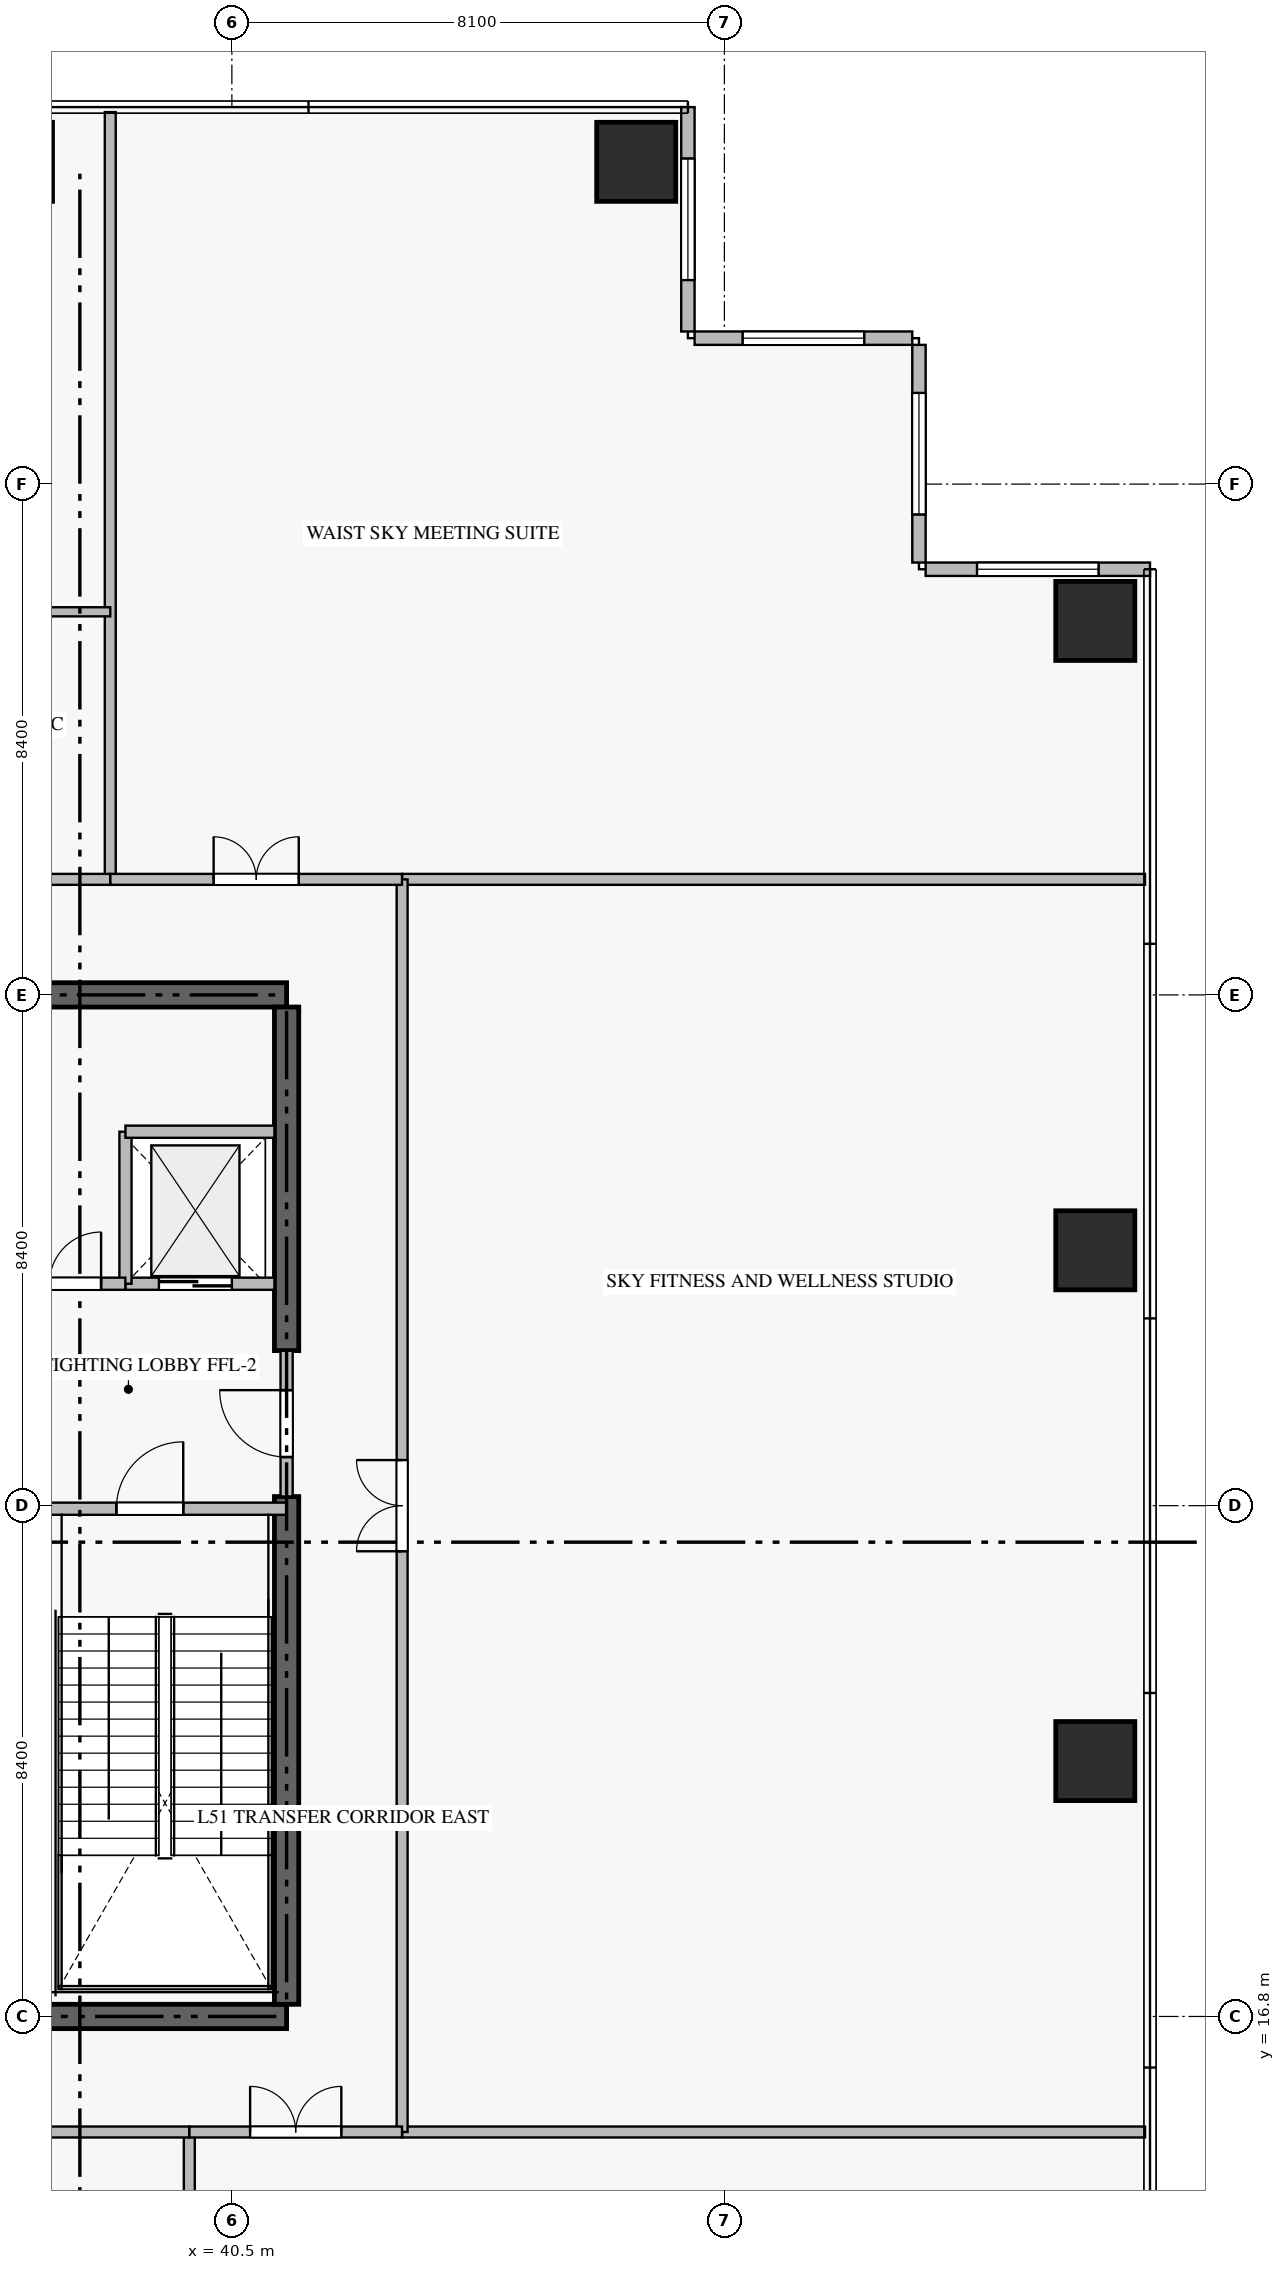
"""IFC4 building model, lengths in metres.
Left out: names, types, materials, properties, quantities, classifications, styles, units other than length and angle.
Written with IfcOpenShell. Run it as: python <this file> out.ifc"""

import sys

from ifc_helpers import new_model, si_unit, direction, frame, frame_2d, origin, origin_2d, place, context, subcontext, project, spatial, rectangle, extrude, source, transform, mapped, element, fill, save


model = new_model("IFC4")
c1 = context("Model", 3, precision=1e-05, world=origin(), true_north=direction((0.0, 1.0)))
c2 = subcontext(c1, "Body", "Model", "MODEL_VIEW")
j1 = project(units=[si_unit("LENGTHUNIT", "METRE"), si_unit("PLANEANGLEUNIT", "RADIAN")], contexts=[c1])
p1 = place(None, origin())
s1 = spatial("IfcSite", under=j1, at=p1, CompositionType="ELEMENT")
p2 = place(p1, origin())
s2 = spatial("IfcBuilding", under=s1, at=p2, CompositionType="ELEMENT")
p3 = place(p2, frame((0.0, 0.0, 204.9)))
s3 = spatial("IfcBuildingStorey", under=s2, at=p3, CompositionType="ELEMENT", Elevation=204.9)
for number, where, z_axis, x_axis in (
    (1, (23.4, 16.8, -0.36), (0.0, 0.0, 1.0), (1.0, 0.0, 0.0)),
    (2, (41.4, 33.6, -0.36), (0.0, 0.0, 1.0), (-1.0, 0.0, 0.0)),
):
    element("IfcWall", number, at=place(p3, frame(where, z_axis=z_axis, x_axis=x_axis)), inside=s3, PredefinedType="SHEAR", context=c2, shape_type="SweptSolid", body=[
        extrude(rectangle(XDim=18.0, YDim=0.4, at=frame_2d((9.0, 0.0))), origin(), (0.0, 0.0, 1.0), 5.468),
    ])
p4 = place(p3, frame((41.4, 17.0, -0.36), z_axis=(0.0, 0.0, 1.0), x_axis=(0.0, 1.0, 0.0)))
e3 = element("IfcWall", 3, at=p4, inside=s3, PredefinedType="SHEAR", context=c2, shape_type="SweptSolid", body=[
    extrude(rectangle(XDim=8.35, YDim=0.4, at=frame_2d((4.175, 0.0))), origin(), (0.0, 0.0, 1.0), 5.468),
])
p5 = place(p3, frame((41.4, 27.75, -0.36), z_axis=(0.0, 0.0, 1.0), x_axis=(0.0, 1.0, 0.0)))
e4 = element("IfcWall", 4, at=p5, inside=s3, PredefinedType="SHEAR", context=c2, shape_type="SweptSolid", body=[
    extrude(rectangle(XDim=5.65, YDim=0.4, at=frame_2d((2.825, 0.0))), origin(), (0.0, 0.0, 1.0), 5.468),
])
m1 = source(origin(), c2, "Body", "SweptSolid", [
    extrude(rectangle(XDim=1.3, YDim=1.3, at=origin_2d()), origin(), (0.0, 0.0, 1.0), 5.47),
])
for number, where, z_axis, x_axis in (
    (5, (47.15, 47.3, -0.36), (0.0, 0.0, 1.0), (1.0, 0.0, 0.0)),
    (6, (54.7, 21.0, -0.36), (0.0, 0.0, 1.0), (1.0, 0.0, 0.0)),
    (7, (54.7, 29.4, -0.36), (0.0, 0.0, 1.0), (1.0, 0.0, 0.0)),
    (8, (54.7, 39.75, -0.36), (0.0, 0.0, 1.0), (1.0, 0.0, 0.0)),
):
    element("IfcColumn", number, at=place(p3, frame(where, z_axis=z_axis, x_axis=x_axis)), inside=s3, PredefinedType="COLUMN", context=c2, shape_type="MappedRepresentation", body=[
        mapped(m1, transform((0.0, 0.0, 0.0), scale=1.0)),
    ])
p6 = place(p3, frame((55.6, 40.6, 0.0), z_axis=(0.0, 0.0, 1.0), x_axis=(-1.0, 0.0, 0.0)))
e9 = element("IfcWall", 9, at=p6, inside=s3, PredefinedType="ELEMENTEDWALL", context=c2, shape_type="SweptSolid", body=[
    extrude(rectangle(XDim=3.69, YDim=0.22, at=frame_2d((1.845, 0.0))), origin(), (0.0, 0.0, 1.0), 3.945),
])
p7 = place(p6, frame((0.845, 0.0, 0.65)))
e10 = element("IfcOpeningElement", 10, at=p7, cuts=e9, PredefinedType="OPENING", context=c2, shape_type="SweptSolid", body=[
    extrude(rectangle(XDim=2.0, YDim=2.2, at=frame_2d((1.0, 1.1))), frame((0.0, 0.12, 0.0), z_axis=(0.0, -1.0, 0.0), x_axis=(1.0, 0.0, 0.0)), (0.0, 0.0, 1.0), 0.24),
])
p8 = place(p3, frame((51.8, 40.71, 0.0), z_axis=(0.0, 0.0, 1.0), x_axis=(0.0, 1.0, 0.0)))
e11 = element("IfcWall", 11, at=p8, inside=s3, PredefinedType="ELEMENTEDWALL", context=c2, shape_type="SweptSolid", body=[
    extrude(rectangle(XDim=3.58, YDim=0.22, at=frame_2d((1.79, 0.0))), origin(), (0.0, 0.0, 1.0), 5.095),
])
p9 = place(p8, frame((0.79, 0.0, 0.65)))
e12 = element("IfcOpeningElement", 12, at=p9, cuts=e11, PredefinedType="OPENING", context=c2, shape_type="SweptSolid", body=[
    extrude(rectangle(XDim=2.0, YDim=2.2, at=frame_2d((1.0, 1.1))), frame((0.0, 0.12, 0.0), z_axis=(0.0, -1.0, 0.0), x_axis=(1.0, 0.0, 0.0)), (0.0, 0.0, 1.0), 0.24),
])
p10 = place(p3, frame((51.69, 44.4, 0.0), z_axis=(0.0, 0.0, 1.0), x_axis=(-1.0, 0.0, 0.0)))
e13 = element("IfcWall", 13, at=p10, inside=s3, PredefinedType="ELEMENTEDWALL", context=c2, shape_type="SweptSolid", body=[
    extrude(rectangle(XDim=3.58, YDim=0.22, at=frame_2d((1.79, 0.0))), origin(), (0.0, 0.0, 1.0), 5.095),
])
p11 = place(p10, frame((0.79, 0.0, 0.65)))
e14 = element("IfcOpeningElement", 14, at=p11, cuts=e13, PredefinedType="OPENING", context=c2, shape_type="SweptSolid", body=[
    extrude(rectangle(XDim=2.0, YDim=2.2, at=frame_2d((1.0, 1.1))), frame((0.0, 0.12, 0.0), z_axis=(0.0, -1.0, 0.0), x_axis=(1.0, 0.0, 0.0)), (0.0, 0.0, 1.0), 0.24),
])
p12 = place(p3, frame((48.0, 44.51, 0.0), z_axis=(0.0, 0.0, 1.0), x_axis=(0.0, 1.0, 0.0)))
e15 = element("IfcWall", 15, at=p12, inside=s3, PredefinedType="ELEMENTEDWALL", context=c2, shape_type="SweptSolid", body=[
    extrude(rectangle(XDim=3.69, YDim=0.22, at=frame_2d((1.845, 0.0))), origin(), (0.0, 0.0, 1.0), 3.945),
])
p13 = place(p12, frame((0.845, 0.0, 0.65)))
e16 = element("IfcOpeningElement", 16, at=p13, cuts=e15, PredefinedType="OPENING", context=c2, shape_type="SweptSolid", body=[
    extrude(rectangle(XDim=2.0, YDim=2.2, at=frame_2d((1.0, 1.1))), frame((0.0, 0.12, 0.0), z_axis=(0.0, -1.0, 0.0), x_axis=(1.0, 0.0, 0.0)), (0.0, 0.0, 1.0), 0.24),
])
p14 = place(p3, frame((36.95, 25.15, 0.0), z_axis=(0.0, 0.0, 1.0), x_axis=(1.0, 0.0, 0.0)))
e17 = element("IfcWall", 17, at=p14, inside=s3, PredefinedType="STANDARD", context=c2, shape_type="SweptSolid", body=[
    extrude(rectangle(XDim=4.45, YDim=0.2, at=frame_2d((2.225, 0.0))), origin(), (0.0, 0.0, 1.0), 5.11),
])
p15 = place(p14, frame((1.65, 0.0, 0.0)))
e18 = element("IfcOpeningElement", 18, at=p15, cuts=e17, PredefinedType="OPENING", context=c2, shape_type="SweptSolid", body=[
    extrude(rectangle(XDim=1.1, YDim=2.15, at=frame_2d((0.55, 1.075))), frame((0.0, 0.11, 0.0), z_axis=(0.0, -1.0, 0.0), x_axis=(1.0, 0.0, 0.0)), (0.0, 0.0, 1.0), 0.22),
])
p16 = place(p3, frame((38.75, 28.85, 0.0), z_axis=(0.0, 0.0, 1.0), x_axis=(1.0, 0.0, 0.0)))
e19 = element("IfcWall", 19, at=p16, inside=s3, PredefinedType="STANDARD", context=c2, shape_type="SweptSolid", body=[
    extrude(rectangle(XDim=2.45, YDim=0.2, at=frame_2d((1.225, 0.0))), origin(), (0.0, 0.0, 1.0), 5.11),
])
p17 = place(p16, frame((0.55, 0.0, 0.0)))
e20 = element("IfcOpeningElement", 20, at=p17, cuts=e19, PredefinedType="OPENING", context=c2, shape_type="SweptSolid", body=[
    extrude(rectangle(XDim=1.2, YDim=2.2, at=frame_2d((0.6, 1.1))), frame((0.0, 0.11, 0.0), z_axis=(0.0, -1.0, 0.0), x_axis=(1.0, 0.0, 0.0)), (0.0, 0.0, 1.0), 0.22),
])
p18 = place(p3, frame((38.75, 28.85, 0.0), z_axis=(0.0, 0.0, 1.0), x_axis=(0.0, 1.0, 0.0)))
e21 = element("IfcWall", 21, at=p18, inside=s3, PredefinedType="STANDARD", context=c2, shape_type="SweptSolid", body=[
    extrude(rectangle(XDim=2.5, YDim=0.2, at=frame_2d((1.25, 0.0))), origin(), (0.0, 0.0, 1.0), 5.11),
])
p19 = place(p3, frame((38.75, 31.35, 0.0), z_axis=(0.0, 0.0, 1.0), x_axis=(1.0, 0.0, 0.0)))
e22 = element("IfcWall", 22, at=p19, inside=s3, PredefinedType="STANDARD", context=c2, shape_type="SweptSolid", body=[
    extrude(rectangle(XDim=2.45, YDim=0.2, at=frame_2d((1.225, 0.0))), origin(), (0.0, 0.0, 1.0), 5.11),
])
p20 = place(p3, frame((37.1, 28.85, 0.0), z_axis=(0.0, 0.0, 1.0), x_axis=(1.0, 0.0, 0.0)))
e23 = element("IfcWall", 23, at=p20, inside=s3, PredefinedType="STANDARD", context=c2, shape_type="SweptSolid", body=[
    extrude(rectangle(XDim=1.648, YDim=0.2, at=frame_2d((0.824, 0.0))), origin(), (0.0, 0.0, 1.0), 5.11),
])
p21 = place(p20, frame((0.399, 0.0, 0.0)))
e24 = element("IfcOpeningElement", 24, at=p21, cuts=e23, PredefinedType="OPENING", context=c2, shape_type="SweptSolid", body=[
    extrude(rectangle(XDim=0.85, YDim=2.1, at=frame_2d((0.425, 1.05))), frame((0.0, 0.11, 0.0), z_axis=(0.0, -1.0, 0.0), x_axis=(1.0, 0.0, 0.0)), (0.0, 0.0, 1.0), 0.22),
])
p22 = place(p3, frame((41.4, 25.352, 0.0), z_axis=(0.0, 0.0, 1.0), x_axis=(0.0, 1.0, 0.0)))
e25 = element("IfcWall", 25, at=p22, inside=s3, PredefinedType="STANDARD", context=c2, shape_type="SweptSolid", body=[
    extrude(rectangle(XDim=2.396, YDim=0.2, at=frame_2d((1.198, 0.0))), origin(), (0.0, 0.0, 1.0), 5.11),
])
p23 = place(p22, frame((0.648, 0.0, 0.0)))
e26 = element("IfcOpeningElement", 26, at=p23, cuts=e25, PredefinedType="OPENING", context=c2, shape_type="SweptSolid", body=[
    extrude(rectangle(XDim=1.1, YDim=2.15, at=frame_2d((0.55, 1.075))), frame((0.0, 0.11, 0.0), z_axis=(0.0, -1.0, 0.0), x_axis=(1.0, 0.0, 0.0)), (0.0, 0.0, 1.0), 0.22),
])
for number, where, z_axis, x_axis in (
    (27, (43.3, 14.9, 0.0), (0.0, 0.0, 1.0), (1.0, 0.0, 0.0)),
    (28, (43.3, 35.5, 0.0), (0.0, 0.0, 1.0), (1.0, 0.0, 0.0)),
):
    element("IfcWall", number, at=place(p3, frame(where, z_axis=z_axis, x_axis=x_axis)), inside=s3, PredefinedType="PARTITIONING", context=c2, shape_type="SweptSolid", body=[
        extrude(rectangle(XDim=12.218, YDim=0.18, at=frame_2d((6.109, 0.0))), origin(), (0.0, 0.0, 1.0), 5.11),
    ])
p24 = place(p3, frame((43.3, 14.9, 0.0), z_axis=(0.0, 0.0, 1.0), x_axis=(0.0, 1.0, 0.0)))
e29 = element("IfcWall", 29, at=p24, inside=s3, PredefinedType="PARTITIONING", context=c2, shape_type="SweptSolid", body=[
    extrude(rectangle(XDim=20.6, YDim=0.18, at=frame_2d((10.3, 0.0))), origin(), (0.0, 0.0, 1.0), 5.11),
])
p25 = place(p24, frame((9.55, 0.0, 0.0)))
e30 = element("IfcOpeningElement", 30, at=p25, cuts=e29, PredefinedType="OPENING", context=c2, shape_type="SweptSolid", body=[
    extrude(rectangle(XDim=1.5, YDim=2.25, at=frame_2d((0.75, 1.125))), frame((0.0, 0.1, 0.0), z_axis=(0.0, -1.0, 0.0), x_axis=(1.0, 0.0, 0.0)), (0.0, 0.0, 1.0), 0.2),
])
for number, where, z_axis, x_axis in (
    (31, (39.8, 2.282, 0.0), (0.0, 0.0, 1.0), (0.0, 1.0, 0.0)),
    (32, (38.5, 35.5, 0.0), (0.0, 0.0, 1.0), (0.0, 1.0, 0.0)),
):
    element("IfcWall", number, at=place(p3, frame(where, z_axis=z_axis, x_axis=x_axis)), inside=s3, PredefinedType="PARTITIONING", context=c2, shape_type="SweptSolid", body=[
        extrude(rectangle(XDim=12.618, YDim=0.18, at=frame_2d((6.309, 0.0))), origin(), (0.0, 0.0, 1.0), 5.11),
    ])
p26 = place(p3, frame((29.502, 14.9, 0.0), z_axis=(0.0, 0.0, 1.0), x_axis=(1.0, 0.0, 0.0)))
e33 = element("IfcWall", 33, at=p26, inside=s3, PredefinedType="PARTITIONING", context=c2, shape_type="SweptSolid", body=[
    extrude(rectangle(XDim=10.298, YDim=0.18, at=frame_2d((5.149, 0.0))), origin(), (0.0, 0.0, 1.0), 5.11),
])
p27 = place(p26, frame((4.349, 0.0, 0.0)))
e34 = element("IfcOpeningElement", 34, at=p27, cuts=e33, PredefinedType="OPENING", context=c2, shape_type="SweptSolid", body=[
    extrude(rectangle(XDim=1.6, YDim=2.3, at=frame_2d((0.8, 1.15))), frame((0.0, 0.1, 0.0), z_axis=(0.0, -1.0, 0.0), x_axis=(1.0, 0.0, 0.0)), (0.0, 0.0, 1.0), 0.2),
])
p28 = place(p3, frame((39.802, 14.9, 0.0), z_axis=(0.0, 0.0, 1.0), x_axis=(1.0, 0.0, 0.0)))
e35 = element("IfcWall", 35, at=p28, inside=s3, PredefinedType="PARTITIONING", context=c2, shape_type="SweptSolid", body=[
    extrude(rectangle(XDim=3.496, YDim=0.18, at=frame_2d((1.748, 0.0))), origin(), (0.0, 0.0, 1.0), 5.11),
])
p29 = place(p28, frame((0.998, 0.0, 0.0)))
e36 = element("IfcOpeningElement", 36, at=p29, cuts=e35, PredefinedType="OPENING", context=c2, shape_type="SweptSolid", body=[
    extrude(rectangle(XDim=1.5, YDim=2.25, at=frame_2d((0.75, 1.125))), frame((0.0, 0.1, 0.0), z_axis=(0.0, -1.0, 0.0), x_axis=(1.0, 0.0, 0.0)), (0.0, 0.0, 1.0), 0.2),
])
p30 = place(p3, frame((33.302, 35.5, 0.0), z_axis=(0.0, 0.0, 1.0), x_axis=(1.0, 0.0, 0.0)))
e37 = element("IfcWall", 37, at=p30, inside=s3, PredefinedType="PARTITIONING", context=c2, shape_type="SweptSolid", body=[
    extrude(rectangle(XDim=5.198, YDim=0.18, at=frame_2d((2.599, 0.0))), origin(), (0.0, 0.0, 1.0), 5.11),
])
p31 = place(p30, frame((2.099, 0.0, 0.0)))
e38 = element("IfcOpeningElement", 38, at=p31, cuts=e37, PredefinedType="OPENING", context=c2, shape_type="SweptSolid", body=[
    extrude(rectangle(XDim=1.0, YDim=2.15, at=frame_2d((0.5, 1.075))), frame((0.0, 0.1, 0.0), z_axis=(0.0, -1.0, 0.0), x_axis=(1.0, 0.0, 0.0)), (0.0, 0.0, 1.0), 0.2),
])
p32 = place(p3, frame((38.502, 35.5, 0.0), z_axis=(0.0, 0.0, 1.0), x_axis=(1.0, 0.0, 0.0)))
e39 = element("IfcWall", 39, at=p32, inside=s3, PredefinedType="PARTITIONING", context=c2, shape_type="SweptSolid", body=[
    extrude(rectangle(XDim=4.796, YDim=0.18, at=frame_2d((2.398, 0.0))), origin(), (0.0, 0.0, 1.0), 5.11),
])
p33 = place(p32, frame((1.698, 0.0, 0.0)))
e40 = element("IfcOpeningElement", 40, at=p33, cuts=e39, PredefinedType="OPENING", context=c2, shape_type="SweptSolid", body=[
    extrude(rectangle(XDim=1.4, YDim=2.25, at=frame_2d((0.7, 1.125))), frame((0.0, 0.1, 0.0), z_axis=(0.0, -1.0, 0.0), x_axis=(1.0, 0.0, 0.0)), (0.0, 0.0, 1.0), 0.2),
])
p34 = place(p3, frame((25.4, 39.9, 0.0), z_axis=(0.0, 0.0, 1.0), x_axis=(1.0, 0.0, 0.0)))
e41 = element("IfcWall", 41, at=p34, inside=s3, PredefinedType="PARTITIONING", context=c2, shape_type="SweptSolid", body=[
    extrude(rectangle(XDim=13.1, YDim=0.15, at=frame_2d((6.55, 0.0))), origin(), (0.0, 0.0, 1.0), 3.945),
])
p35 = place(p34, frame((2.196, 0.0, 0.0)))
e42 = element("IfcOpeningElement", 42, at=p35, cuts=e41, PredefinedType="OPENING", context=c2, shape_type="SweptSolid", body=[
    extrude(rectangle(XDim=0.9, YDim=2.1, at=frame_2d((0.45, 1.05))), frame((0.0, 0.085, 0.0), z_axis=(0.0, -1.0, 0.0), x_axis=(1.0, 0.0, 0.0)), (0.0, 0.0, 1.0), 0.17),
])
m2 = source(origin(), c2, "Body", "SweptSolid", [
    extrude(rectangle(XDim=2.0, YDim=2.2, at=frame_2d((1.0, 1.1))), frame((0.0, 0.03, 0.0), z_axis=(0.0, -1.0, 0.0), x_axis=(1.0, 0.0, 0.0)), (0.0, 0.0, 1.0), 0.06),
])
p36 = place(p7, origin())
e43 = element("IfcWindow", 43, at=p36, inside=s3, PartitioningType="SINGLE_PANEL", PredefinedType="WINDOW", context=c2, shape_type="MappedRepresentation", body=[
    mapped(m2, transform((0.0, 0.0, 0.0), scale=1.0)),
])
fill(e10, e43)
p37 = place(p9, origin())
e44 = element("IfcWindow", 44, at=p37, inside=s3, PartitioningType="SINGLE_PANEL", PredefinedType="WINDOW", context=c2, shape_type="MappedRepresentation", body=[
    mapped(m2, transform((0.0, 0.0, 0.0), scale=1.0)),
])
fill(e12, e44)
p38 = place(p11, origin())
e45 = element("IfcWindow", 45, at=p38, inside=s3, PartitioningType="SINGLE_PANEL", PredefinedType="WINDOW", context=c2, shape_type="MappedRepresentation", body=[
    mapped(m2, transform((0.0, 0.0, 0.0), scale=1.0)),
])
fill(e14, e45)
p39 = place(p13, origin())
e46 = element("IfcWindow", 46, at=p39, inside=s3, PartitioningType="SINGLE_PANEL", PredefinedType="WINDOW", context=c2, shape_type="MappedRepresentation", body=[
    mapped(m2, transform((0.0, 0.0, 0.0), scale=1.0)),
])
fill(e16, e46)
m3 = source(origin(), c2, "Body", "SweptSolid", [
    extrude(rectangle(XDim=1.1, YDim=2.15, at=frame_2d((0.55, 1.075))), frame((0.0, 0.025, 0.0), z_axis=(0.0, -1.0, 0.0), x_axis=(1.0, 0.0, 0.0)), (0.0, 0.0, 1.0), 0.05),
])
p40 = place(p15, origin())
e47 = element("IfcDoor", 47, at=p40, inside=s3, OperationType="SINGLE_SWING_RIGHT", PredefinedType="DOOR", context=c2, shape_type="MappedRepresentation", body=[
    mapped(m3, transform((0.0, 0.0, 0.0), scale=1.0)),
])
fill(e18, e47)
m4 = source(origin(), c2, "Body", "SweptSolid", [
    extrude(rectangle(XDim=1.2, YDim=2.2, at=frame_2d((0.6, 1.1))), frame((0.0, 0.025, 0.0), z_axis=(0.0, -1.0, 0.0), x_axis=(1.0, 0.0, 0.0)), (0.0, 0.0, 1.0), 0.05),
])
p41 = place(p17, origin())
e48 = element("IfcDoor", 48, at=p41, inside=s3, OperationType="DOUBLE_DOOR_SLIDING", PredefinedType="DOOR", context=c2, shape_type="MappedRepresentation", body=[
    mapped(m4, transform((0.0, 0.0, 0.0), scale=1.0)),
])
fill(e20, e48)
m5 = source(origin(), c2, "Body", "SweptSolid", [
    extrude(rectangle(XDim=0.85, YDim=2.1, at=frame_2d((0.425, 1.05))), frame((0.0, 0.025, 0.0), z_axis=(0.0, -1.0, 0.0), x_axis=(1.0, 0.0, 0.0)), (0.0, 0.0, 1.0), 0.05),
])
p42 = place(p21, origin())
e49 = element("IfcDoor", 49, at=p42, inside=s3, OperationType="SINGLE_SWING_RIGHT", PredefinedType="DOOR", context=c2, shape_type="MappedRepresentation", body=[
    mapped(m5, transform((0.0, 0.0, 0.0), scale=1.0)),
])
fill(e24, e49)
p43 = place(p23, origin())
e50 = element("IfcDoor", 50, at=p43, inside=s3, OperationType="SINGLE_SWING_RIGHT", PredefinedType="DOOR", context=c2, shape_type="MappedRepresentation", body=[
    mapped(m3, transform((0.0, 0.0, 0.0), scale=1.0)),
])
fill(e26, e50)
m6 = source(origin(), c2, "Body", "SweptSolid", [
    extrude(rectangle(XDim=1.5, YDim=2.25, at=frame_2d((0.75, 1.125))), frame((0.0, 0.025, 0.0), z_axis=(0.0, -1.0, 0.0), x_axis=(1.0, 0.0, 0.0)), (0.0, 0.0, 1.0), 0.05),
])
p44 = place(p25, origin())
e51 = element("IfcDoor", 51, at=p44, inside=s3, OperationType="DOUBLE_DOOR_SINGLE_SWING", PredefinedType="DOOR", context=c2, shape_type="MappedRepresentation", body=[
    mapped(m6, transform((0.0, 0.0, 0.0), scale=1.0)),
])
fill(e30, e51)
p45 = place(p29, origin())
e52 = element("IfcDoor", 52, at=p45, inside=s3, OperationType="DOUBLE_DOOR_SINGLE_SWING", PredefinedType="DOOR", context=c2, shape_type="MappedRepresentation", body=[
    mapped(m6, transform((0.0, 0.0, 0.0), scale=1.0)),
])
fill(e36, e52)
m7 = source(origin(), c2, "Body", "SweptSolid", [
    extrude(rectangle(XDim=1.4, YDim=2.25, at=frame_2d((0.7, 1.125))), frame((0.0, 0.025, 0.0), z_axis=(0.0, -1.0, 0.0), x_axis=(1.0, 0.0, 0.0)), (0.0, 0.0, 1.0), 0.05),
])
p46 = place(p33, origin())
e53 = element("IfcDoor", 53, at=p46, inside=s3, OperationType="DOUBLE_DOOR_SINGLE_SWING", PredefinedType="DOOR", context=c2, shape_type="MappedRepresentation", body=[
    mapped(m7, transform((0.0, 0.0, 0.0), scale=1.0)),
])
fill(e40, e53)
save(model, sys.argv[1])
